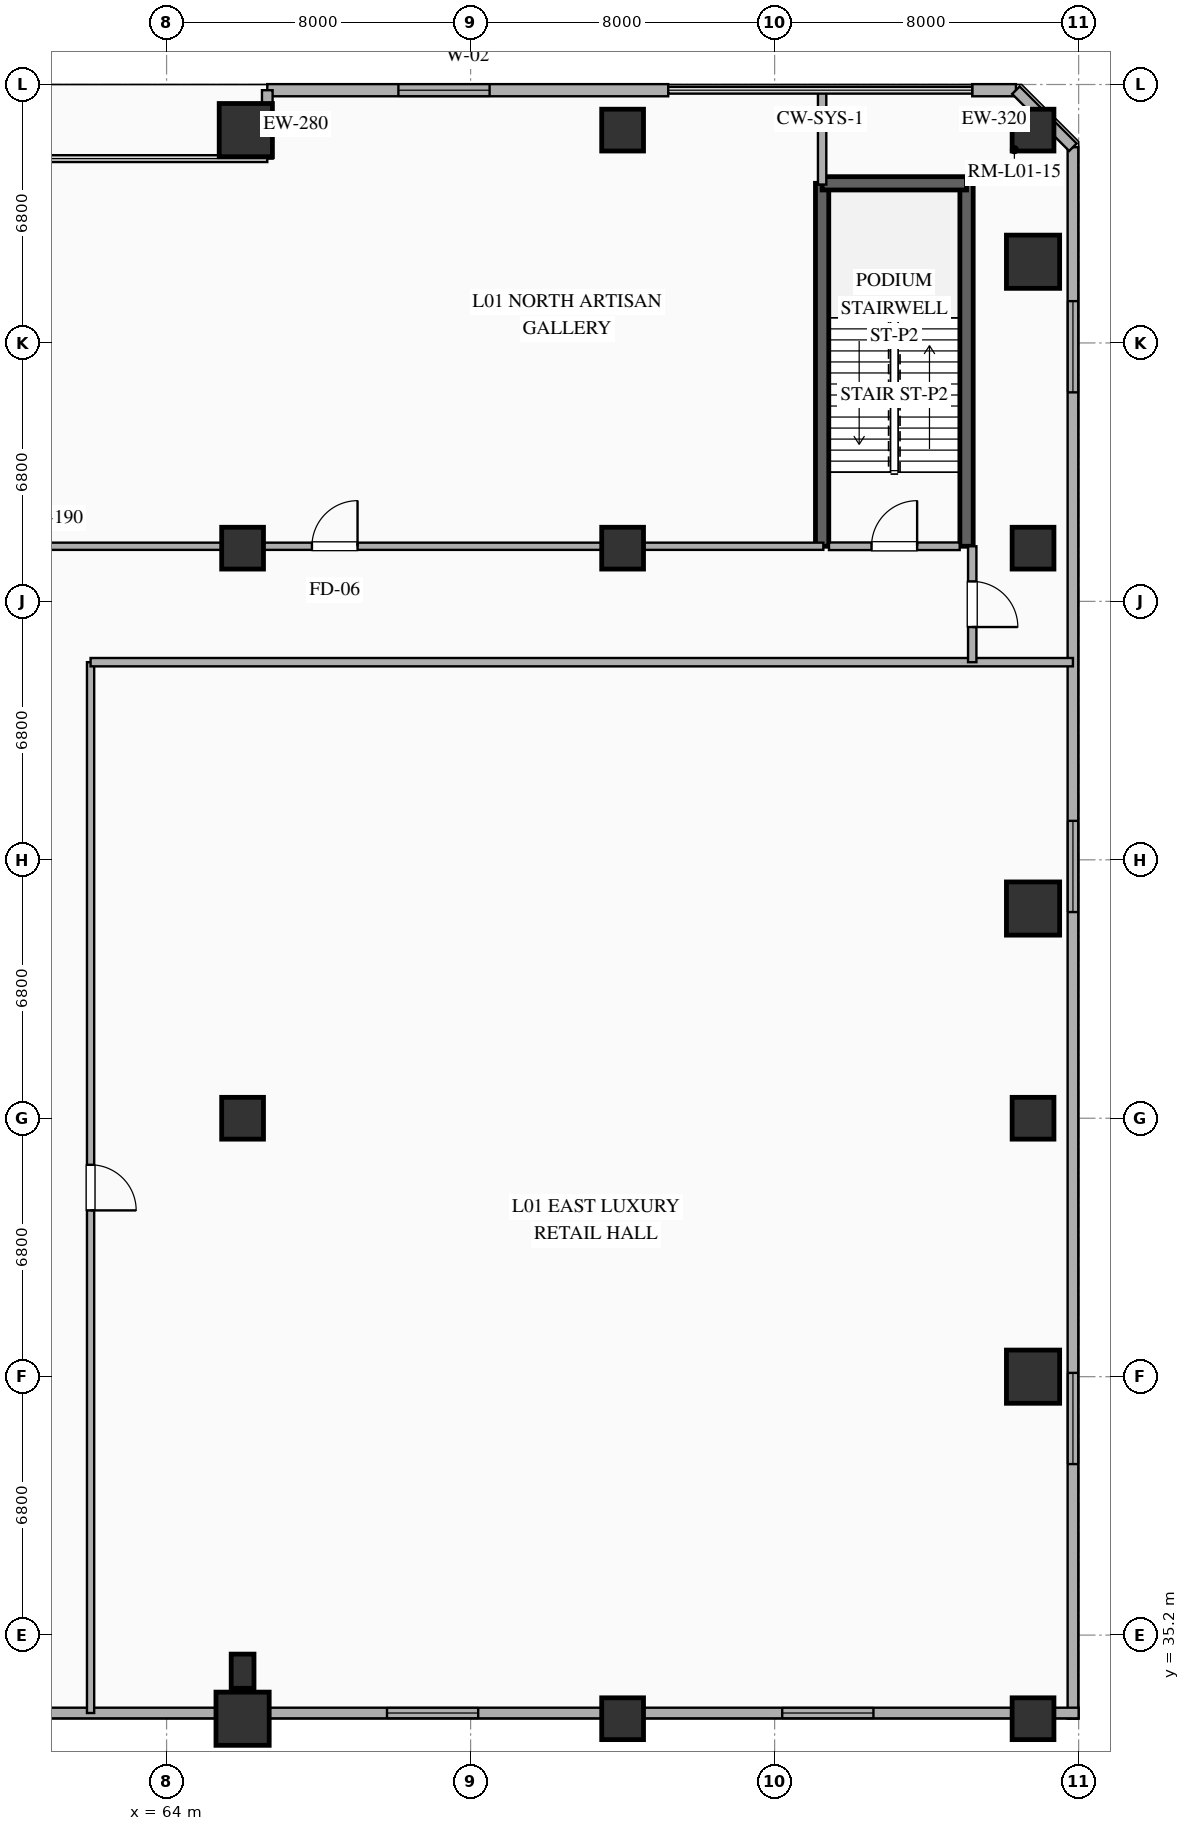
"""IFC4 building model, lengths in metres.
Left out: names, types, materials, properties, quantities, classifications, styles, units other than length and angle.
Written with IfcOpenShell. Run it as: python <this file> out.ifc"""

import sys

from ifc_helpers import new_model, si_unit, direction, frame, frame_2d, origin, origin_2d, place, context, subcontext, project, spatial, rectangle, extrude, element, fill, save


model = new_model("IFC4")
c1 = context("Model", 3, precision=1e-05, world=origin(), true_north=direction((0.0, 1.0)))
c2 = subcontext(c1, "Body", "Model", "MODEL_VIEW")
j1 = project(units=[si_unit("LENGTHUNIT", "METRE"), si_unit("PLANEANGLEUNIT", "RADIAN")], contexts=[c1])
p1 = place(None, origin())
s1 = spatial("IfcSite", under=j1, at=p1, CompositionType="ELEMENT")
p2 = place(p1, origin())
s2 = spatial("IfcBuilding", under=s1, at=p2, CompositionType="ELEMENT")
p3 = place(p2, frame((0.0, 0.0, 6.0)))
s3 = spatial("IfcBuildingStorey", under=s2, at=p3, CompositionType="ELEMENT", Elevation=6.0)
for number, where, z_axis, x_axis in (
    (1, (66.0, 63.8, 0.0), (0.0, 0.0, 1.0), (1.0, 0.0, 0.0)),
    (2, (76.0, 74.8, 0.0), (0.0, 0.0, 1.0), (1.0, 0.0, 0.0)),
    (3, (76.0, 63.8, 0.0), (0.0, 0.0, 1.0), (1.0, 0.0, 0.0)),
    (4, (86.8, 74.8, 0.0), (0.0, 0.0, 1.0), (1.0, 0.0, 0.0)),
    (5, (86.8, 63.8, 0.0), (0.0, 0.0, 1.0), (1.0, 0.0, 0.0)),
    (6, (86.8, 33.0, 0.0), (0.0, 0.0, 1.0), (1.0, 0.0, 0.0)),
    (7, (86.8, 48.8, 0.0), (0.0, 0.0, 1.0), (1.0, 0.0, 0.0)),
):
    element("IfcColumn", number, at=place(p3, frame(where, z_axis=z_axis, x_axis=x_axis)), inside=s3, PredefinedType="COLUMN", context=c2, shape_type="SweptSolid", body=[
        extrude(rectangle(XDim=1.1, YDim=1.1, at=origin_2d()), origin(), (0.0, 0.0, 1.0), 5.12),
    ])
p4 = place(p3, frame((66.0, 33.0, 0.0), z_axis=(0.0, 0.0, 1.0), x_axis=(1.0, 0.0, 0.0)))
e8 = element("IfcColumn", 8, at=p4, inside=s3, PredefinedType="COLUMN", context=c2, shape_type="SweptSolid", body=[
    extrude(rectangle(XDim=1.4, YDim=1.4, at=origin_2d()), origin(), (0.0, 0.0, 1.0), 5.12),
])
for number, where, z_axis, x_axis in (
    (9, (76.0, 33.0, 0.0), (0.0, 0.0, 1.0), (1.0, 0.0, 0.0)),
    (10, (66.0, 48.8, 0.0), (0.0, 0.0, 1.0), (1.0, 0.0, 0.0)),
):
    element("IfcColumn", number, at=place(p3, frame(where, z_axis=z_axis, x_axis=x_axis)), inside=s3, PredefinedType="COLUMN", context=c2, shape_type="SweptSolid", body=[
        extrude(rectangle(XDim=1.1, YDim=1.1, at=origin_2d()), origin(), (0.0, 0.0, 1.0), 5.12),
    ])
for number, where, z_axis, x_axis in (
    (11, (86.8, 42.0, 0.0), (0.0, 0.0, 1.0), (1.0, 0.0, 0.0)),
    (12, (86.8, 54.318, 0.0), (0.0, 0.0, 1.0), (1.0, 0.0, 0.0)),
    (13, (86.8, 71.337, 0.0), (0.0, 0.0, 1.0), (1.0, 0.0, 0.0)),
    (14, (66.084, 74.8, 0.0), (0.0, 0.0, 1.0), (1.0, 0.0, 0.0)),
):
    element("IfcColumn", number, at=place(p3, frame(where, z_axis=z_axis, x_axis=x_axis)), inside=s3, PredefinedType="COLUMN", context=c2, shape_type="SweptSolid", body=[
        extrude(rectangle(XDim=1.4, YDim=1.4, at=origin_2d()), origin(), (0.0, 0.0, 1.0), 5.12),
    ])
for number, where, z_axis, x_axis in (
    (15, (81.25, 63.85, 0.0), (0.0, 0.0, 1.0), (0.0, 1.0, 0.0)),
    (16, (85.05, 63.85, 0.0), (0.0, 0.0, 1.0), (0.0, 1.0, 0.0)),
):
    element("IfcWall", number, at=place(p3, frame(where, z_axis=z_axis, x_axis=x_axis)), inside=s3, PredefinedType="SHEAR", context=c2, shape_type="SweptSolid", body=[
        extrude(rectangle(XDim=9.55, YDim=0.35, at=frame_2d((4.775, 0.0))), origin(), (0.0, 0.0, 1.0), 5.12),
    ])
p5 = place(p3, frame((81.25, 73.4, 0.0), z_axis=(0.0, 0.0, 1.0), x_axis=(1.0, 0.0, 0.0)))
e17 = element("IfcWall", 17, at=p5, inside=s3, PredefinedType="SHEAR", context=c2, shape_type="SweptSolid", body=[
    extrude(rectangle(XDim=3.8, YDim=0.35, at=frame_2d((1.9, 0.0))), origin(), (0.0, 0.0, 1.0), 5.12),
])
p6 = place(p3, frame((66.0, 34.25, 0.0), z_axis=(0.0, 0.0, 1.0), x_axis=(1.0, 0.0, 0.0)))
e18 = element("IfcColumn", 18, at=p6, inside=s3, PredefinedType="PILASTER", context=c2, shape_type="SweptSolid", body=[
    extrude(rectangle(XDim=0.6, YDim=0.9, at=origin_2d()), origin(), (0.0, 0.0, 1.0), 5.12),
])
p7 = place(p3, frame((86.35, 75.85, 0.0), z_axis=(0.0, 0.0, 1.0), x_axis=(-1.0, 0.0, 0.0)))
e19 = element("IfcWall", 19, at=p7, inside=s3, PredefinedType="SOLIDWALL", context=c2, shape_type="SweptSolid", body=[
    extrude(rectangle(XDim=1.15, YDim=0.32, at=frame_2d((0.575, 0.0))), origin(), (0.0, 0.0, 1.0), 5.12),
])
p8 = place(p3, frame((66.65, 75.85, 0.0), z_axis=(0.0, 0.0, 1.0), x_axis=(1.0, 0.0, 0.0)))
e20 = element("IfcWall", 20, at=p8, inside=s3, PredefinedType="SOLIDWALL", context=c2, shape_type="SweptSolid", body=[
    extrude(rectangle(XDim=10.55, YDim=0.32, at=frame_2d((5.275, 0.0))), origin(), (0.0, 0.0, 1.0), 5.12),
])
p9 = place(p8, frame((3.45, 0.0, 0.9)))
e21 = element("IfcOpeningElement", 21, at=p9, cuts=e20, PredefinedType="OPENING", context=c2, shape_type="SweptSolid", body=[
    extrude(rectangle(XDim=2.4, YDim=2.6, at=frame_2d((1.2, 1.3))), frame((0.0, 0.17, 0.0), z_axis=(0.0, -1.0, 0.0), x_axis=(1.0, 0.0, 0.0)), (0.0, 0.0, 1.0), 0.34),
])
p10 = place(p3, frame((66.65, 75.85, 0.0), z_axis=(0.0, 0.0, 1.0), x_axis=(0.0, -1.0, 0.0)))
e22 = element("IfcWall", 22, at=p10, inside=s3, PredefinedType="SOLIDWALL", context=c2, shape_type="SweptSolid", body=[
    extrude(rectangle(XDim=1.8, YDim=0.28, at=frame_2d((0.9, 0.0))), origin(), (0.0, 0.0, 1.0), 5.12),
])
p11 = place(p3, frame((87.85, 74.35, 0.0), z_axis=(0.0, 0.0, 1.0), x_axis=(0.0, -1.0, 0.0)))
e23 = element("IfcWall", 23, at=p11, inside=s3, PredefinedType="SOLIDWALL", context=c2, shape_type="SweptSolid", body=[
    extrude(rectangle(XDim=41.35, YDim=0.28, at=frame_2d((20.675, 0.0))), origin(), (0.0, 0.0, 1.0), 5.12),
])
p12 = place(p11, frame((4.05, 0.0, 0.9)))
e24 = element("IfcOpeningElement", 24, at=p12, cuts=e23, PredefinedType="OPENING", context=c2, shape_type="SweptSolid", body=[
    extrude(rectangle(XDim=2.4, YDim=2.6, at=frame_2d((1.2, 1.3))), frame((0.0, 0.15, 0.0), z_axis=(0.0, -1.0, 0.0), x_axis=(1.0, 0.0, 0.0)), (0.0, 0.0, 1.0), 0.3),
])
p13 = place(p11, frame((17.725, 0.0, 0.9)))
e25 = element("IfcOpeningElement", 25, at=p13, cuts=e23, PredefinedType="OPENING", context=c2, shape_type="SweptSolid", body=[
    extrude(rectangle(XDim=2.4, YDim=2.6, at=frame_2d((1.2, 1.3))), frame((0.0, 0.15, 0.0), z_axis=(0.0, -1.0, 0.0), x_axis=(1.0, 0.0, 0.0)), (0.0, 0.0, 1.0), 0.3),
])
p14 = place(p11, frame((32.25, 0.0, 0.9)))
e26 = element("IfcOpeningElement", 26, at=p14, cuts=e23, PredefinedType="OPENING", context=c2, shape_type="SweptSolid", body=[
    extrude(rectangle(XDim=2.4, YDim=2.6, at=frame_2d((1.2, 1.3))), frame((0.0, 0.15, 0.0), z_axis=(0.0, -1.0, 0.0), x_axis=(1.0, 0.0, 0.0)), (0.0, 0.0, 1.0), 0.3),
])
p15 = place(p3, frame((88.0, 33.15, 0.0), z_axis=(0.0, 0.0, 1.0), x_axis=(-1.0, 0.0, 0.0)))
e27 = element("IfcWall", 27, at=p15, inside=s3, PredefinedType="SOLIDWALL", context=c2, shape_type="SweptSolid", body=[
    extrude(rectangle(XDim=80.0, YDim=0.28, at=frame_2d((40.0, 0.0))), origin(), (0.0, 0.0, 1.0), 5.12),
])
p16 = place(p15, frame((5.4, 0.0, 0.9)))
e28 = element("IfcOpeningElement", 28, at=p16, cuts=e27, PredefinedType="OPENING", context=c2, shape_type="SweptSolid", body=[
    extrude(rectangle(XDim=2.4, YDim=2.6, at=frame_2d((1.2, 1.3))), frame((0.0, 0.15, 0.0), z_axis=(0.0, -1.0, 0.0), x_axis=(1.0, 0.0, 0.0)), (0.0, 0.0, 1.0), 0.3),
])
p17 = place(p15, frame((15.8, 0.0, 0.9)))
e29 = element("IfcOpeningElement", 29, at=p17, cuts=e27, PredefinedType="OPENING", context=c2, shape_type="SweptSolid", body=[
    extrude(rectangle(XDim=2.4, YDim=2.6, at=frame_2d((1.2, 1.3))), frame((0.0, 0.15, 0.0), z_axis=(0.0, -1.0, 0.0), x_axis=(1.0, 0.0, 0.0)), (0.0, 0.0, 1.0), 0.3),
])
p18 = place(p15, frame((38.8, 0.0, 0.9)))
e30 = element("IfcOpeningElement", 30, at=p18, cuts=e27, PredefinedType="OPENING", context=c2, shape_type="SweptSolid", body=[
    extrude(rectangle(XDim=2.4, YDim=2.6, at=frame_2d((1.2, 1.3))), frame((0.0, 0.15, 0.0), z_axis=(0.0, -1.0, 0.0), x_axis=(1.0, 0.0, 0.0)), (0.0, 0.0, 1.0), 0.3),
])
p19 = place(p15, frame((61.8, 0.0, 0.9)))
e31 = element("IfcOpeningElement", 31, at=p19, cuts=e27, PredefinedType="OPENING", context=c2, shape_type="SweptSolid", body=[
    extrude(rectangle(XDim=2.4, YDim=2.6, at=frame_2d((1.2, 1.3))), frame((0.0, 0.15, 0.0), z_axis=(0.0, -1.0, 0.0), x_axis=(1.0, 0.0, 0.0)), (0.0, 0.0, 1.0), 0.3),
])
p20 = place(p15, frame((72.2, 0.0, 0.9)))
e32 = element("IfcOpeningElement", 32, at=p20, cuts=e27, PredefinedType="OPENING", context=c2, shape_type="SweptSolid", body=[
    extrude(rectangle(XDim=2.4, YDim=2.6, at=frame_2d((1.2, 1.3))), frame((0.0, 0.15, 0.0), z_axis=(0.0, -1.0, 0.0), x_axis=(1.0, 0.0, 0.0)), (0.0, 0.0, 1.0), 0.3),
])
p21 = place(p3, frame((87.85, 74.35, 0.0), z_axis=(0.0, 0.0, 1.0), x_axis=(-0.707106781187, 0.707106781187, 0.0)))
e33 = element("IfcWall", 33, at=p21, inside=s3, PredefinedType="SOLIDWALL", context=c2, shape_type="SweptSolid", body=[
    extrude(rectangle(XDim=2.121, YDim=0.28, at=frame_2d((1.061, 0.0))), origin(), (0.0, 0.0, 1.0), 5.12),
])
p22 = place(p3, frame((81.43, 63.85, 0.0), z_axis=(0.0, 0.0, 1.0), x_axis=(1.0, 0.0, 0.0)))
e34 = element("IfcWall", 34, at=p22, inside=s3, PredefinedType="SOLIDWALL", context=c2, shape_type="SweptSolid", body=[
    extrude(rectangle(XDim=3.44, YDim=0.2, at=frame_2d((1.72, 0.0))), origin(), (0.0, 0.0, 1.0), 4.32),
])
p23 = place(p22, frame((1.12, 0.0, 0.0)))
e35 = element("IfcOpeningElement", 35, at=p23, cuts=e34, PredefinedType="OPENING", context=c2, shape_type="SweptSolid", body=[
    extrude(rectangle(XDim=1.2, YDim=2.15, at=frame_2d((0.6, 1.075))), frame((0.0, 0.11, 0.0), z_axis=(0.0, -1.0, 0.0), x_axis=(1.0, 0.0, 0.0)), (0.0, 0.0, 1.0), 0.22),
])
p24 = place(p3, frame((40.768, 63.85, 0.0), z_axis=(0.0, 0.0, 1.0), x_axis=(1.0, 0.0, 0.0)))
e36 = element("IfcWall", 36, at=p24, inside=s3, PredefinedType="PARTITIONING", context=c2, shape_type="SweptSolid", body=[
    extrude(rectangle(XDim=40.514, YDim=0.19, at=frame_2d((20.257, 0.0))), origin(), (0.0, 0.0, 1.0), 4.32),
])
p25 = place(p24, frame((27.057, 0.0, 0.0)))
e37 = element("IfcOpeningElement", 37, at=p25, cuts=e36, PredefinedType="OPENING", context=c2, shape_type="SweptSolid", body=[
    extrude(rectangle(XDim=1.2, YDim=2.25, at=frame_2d((0.6, 1.125))), frame((0.0, 0.105, 0.0), z_axis=(0.0, -1.0, 0.0), x_axis=(1.0, 0.0, 0.0)), (0.0, 0.0, 1.0), 0.21),
])
p26 = place(p24, frame((8.232, 0.0, 0.0)))
e38 = element("IfcOpeningElement", 38, at=p26, cuts=e36, PredefinedType="OPENING", context=c2, shape_type="SweptSolid", body=[
    extrude(rectangle(XDim=1.2, YDim=2.25, at=frame_2d((0.6, 1.125))), frame((0.0, 0.105, 0.0), z_axis=(0.0, -1.0, 0.0), x_axis=(1.0, 0.0, 0.0)), (0.0, 0.0, 1.0), 0.21),
])
p27 = place(p24, frame((3.982, 0.0, 0.0)))
e39 = element("IfcOpeningElement", 39, at=p27, cuts=e36, PredefinedType="OPENING", context=c2, shape_type="SweptSolid", body=[
    extrude(rectangle(XDim=0.9, YDim=2.1, at=frame_2d((0.45, 1.05))), frame((0.0, 0.105, 0.0), z_axis=(0.0, -1.0, 0.0), x_axis=(1.0, 0.0, 0.0)), (0.0, 0.0, 1.0), 0.21),
])
p28 = place(p3, frame((62.0, 60.8, 0.0), z_axis=(0.0, 0.0, 1.0), x_axis=(0.0, -1.0, 0.0)))
e40 = element("IfcWall", 40, at=p28, inside=s3, PredefinedType="PARTITIONING", context=c2, shape_type="SweptSolid", body=[
    extrude(rectangle(XDim=27.65, YDim=0.19, at=frame_2d((13.825, 0.0))), origin(), (0.0, 0.0, 1.0), 4.32),
])
p29 = place(p28, frame((13.225, 0.0, 0.0)))
e41 = element("IfcOpeningElement", 41, at=p29, cuts=e40, PredefinedType="OPENING", context=c2, shape_type="SweptSolid", body=[
    extrude(rectangle(XDim=1.2, YDim=2.25, at=frame_2d((0.6, 1.125))), frame((0.0, 0.105, 0.0), z_axis=(0.0, -1.0, 0.0), x_axis=(1.0, 0.0, 0.0)), (0.0, 0.0, 1.0), 0.21),
])
p30 = place(p3, frame((87.85, 60.8, 0.0), z_axis=(0.0, 0.0, 1.0), x_axis=(-1.0, 0.0, 0.0)))
e42 = element("IfcWall", 42, at=p30, inside=s3, PredefinedType="SOLIDWALL", context=c2, shape_type="SweptSolid", body=[
    extrude(rectangle(XDim=25.85, YDim=0.22, at=frame_2d((12.925, 0.0))), origin(), (0.0, 0.0, 1.0), 4.32),
])
p31 = place(p3, frame((85.2, 63.85, 0.0), z_axis=(0.0, 0.0, 1.0), x_axis=(0.0, -1.0, 0.0)))
e43 = element("IfcWall", 43, at=p31, inside=s3, PredefinedType="SOLIDWALL", context=c2, shape_type="SweptSolid", body=[
    extrude(rectangle(XDim=3.05, YDim=0.22, at=frame_2d((1.525, 0.0))), origin(), (0.0, 0.0, 1.0), 4.32),
])
p32 = place(p31, frame((0.925, 0.0, 0.0)))
e44 = element("IfcOpeningElement", 44, at=p32, cuts=e43, PredefinedType="OPENING", context=c2, shape_type="SweptSolid", body=[
    extrude(rectangle(XDim=1.2, YDim=2.25, at=frame_2d((0.6, 1.125))), frame((0.0, 0.12, 0.0), z_axis=(0.0, -1.0, 0.0), x_axis=(1.0, 0.0, 0.0)), (0.0, 0.0, 1.0), 0.24),
])
p33 = place(p3, frame((81.25, 75.85, 0.0), z_axis=(0.0, 0.0, 1.0), x_axis=(0.0, -1.0, 0.0)))
e45 = element("IfcWall", 45, at=p33, inside=s3, PredefinedType="SOLIDWALL", context=c2, shape_type="SweptSolid", body=[
    extrude(rectangle(XDim=2.482, YDim=0.22, at=frame_2d((1.241, 0.0))), origin(), (0.0, 0.0, 1.0), 4.32),
])
p34 = place(p9, origin())
e46 = element("IfcWindow", 46, at=p34, inside=s3, PartitioningType="SINGLE_PANEL", PredefinedType="WINDOW", context=c2, shape_type="SweptSolid", body=[
    extrude(rectangle(XDim=2.4, YDim=2.6, at=frame_2d((1.2, 1.3))), frame((0.0, 0.03, 0.0), z_axis=(0.0, -1.0, 0.0), x_axis=(1.0, 0.0, 0.0)), (0.0, 0.0, 1.0), 0.06),
])
fill(e21, e46)
p35 = place(p12, origin())
e47 = element("IfcWindow", 47, at=p35, inside=s3, PartitioningType="SINGLE_PANEL", PredefinedType="WINDOW", context=c2, shape_type="SweptSolid", body=[
    extrude(rectangle(XDim=2.4, YDim=2.6, at=frame_2d((1.2, 1.3))), frame((0.0, 0.03, 0.0), z_axis=(0.0, -1.0, 0.0), x_axis=(1.0, 0.0, 0.0)), (0.0, 0.0, 1.0), 0.06),
])
fill(e24, e47)
p36 = place(p13, origin())
e48 = element("IfcWindow", 48, at=p36, inside=s3, PartitioningType="SINGLE_PANEL", PredefinedType="WINDOW", context=c2, shape_type="SweptSolid", body=[
    extrude(rectangle(XDim=2.4, YDim=2.6, at=frame_2d((1.2, 1.3))), frame((0.0, 0.03, 0.0), z_axis=(0.0, -1.0, 0.0), x_axis=(1.0, 0.0, 0.0)), (0.0, 0.0, 1.0), 0.06),
])
fill(e25, e48)
p37 = place(p14, origin())
e49 = element("IfcWindow", 49, at=p37, inside=s3, PartitioningType="SINGLE_PANEL", PredefinedType="WINDOW", context=c2, shape_type="SweptSolid", body=[
    extrude(rectangle(XDim=2.4, YDim=2.6, at=frame_2d((1.2, 1.3))), frame((0.0, 0.03, 0.0), z_axis=(0.0, -1.0, 0.0), x_axis=(1.0, 0.0, 0.0)), (0.0, 0.0, 1.0), 0.06),
])
fill(e26, e49)
p38 = place(p16, origin())
e50 = element("IfcWindow", 50, at=p38, inside=s3, PartitioningType="SINGLE_PANEL", PredefinedType="WINDOW", context=c2, shape_type="SweptSolid", body=[
    extrude(rectangle(XDim=2.4, YDim=2.6, at=frame_2d((1.2, 1.3))), frame((0.0, 0.03, 0.0), z_axis=(0.0, -1.0, 0.0), x_axis=(1.0, 0.0, 0.0)), (0.0, 0.0, 1.0), 0.06),
])
fill(e28, e50)
p39 = place(p17, origin())
e51 = element("IfcWindow", 51, at=p39, inside=s3, PartitioningType="SINGLE_PANEL", PredefinedType="WINDOW", context=c2, shape_type="SweptSolid", body=[
    extrude(rectangle(XDim=2.4, YDim=2.6, at=frame_2d((1.2, 1.3))), frame((0.0, 0.03, 0.0), z_axis=(0.0, -1.0, 0.0), x_axis=(1.0, 0.0, 0.0)), (0.0, 0.0, 1.0), 0.06),
])
fill(e29, e51)
p40 = place(p23, origin())
e52 = element("IfcDoor", 52, at=p40, inside=s3, OperationType="SINGLE_SWING_RIGHT", PredefinedType="DOOR", context=c2, shape_type="SweptSolid", body=[
    extrude(rectangle(XDim=1.2, YDim=2.15, at=frame_2d((0.6, 1.075))), frame((0.0, 0.025, 0.0), z_axis=(0.0, -1.0, 0.0), x_axis=(1.0, 0.0, 0.0)), (0.0, 0.0, 1.0), 0.05),
])
fill(e35, e52)
p41 = place(p25, origin())
e53 = element("IfcDoor", 53, at=p41, inside=s3, OperationType="SINGLE_SWING_RIGHT", PredefinedType="DOOR", context=c2, shape_type="SweptSolid", body=[
    extrude(rectangle(XDim=1.2, YDim=2.25, at=frame_2d((0.6, 1.125))), frame((0.0, 0.025, 0.0), z_axis=(0.0, -1.0, 0.0), x_axis=(1.0, 0.0, 0.0)), (0.0, 0.0, 1.0), 0.05),
])
fill(e37, e53)
p42 = place(p29, origin())
e54 = element("IfcDoor", 54, at=p42, inside=s3, OperationType="SINGLE_SWING_RIGHT", PredefinedType="DOOR", context=c2, shape_type="SweptSolid", body=[
    extrude(rectangle(XDim=1.2, YDim=2.25, at=frame_2d((0.6, 1.125))), frame((0.0, 0.025, 0.0), z_axis=(0.0, -1.0, 0.0), x_axis=(1.0, 0.0, 0.0)), (0.0, 0.0, 1.0), 0.05),
])
fill(e41, e54)
p43 = place(p32, origin())
e55 = element("IfcDoor", 55, at=p43, inside=s3, OperationType="SINGLE_SWING_RIGHT", PredefinedType="DOOR", context=c2, shape_type="SweptSolid", body=[
    extrude(rectangle(XDim=1.2, YDim=2.25, at=frame_2d((0.6, 1.125))), frame((0.0, 0.025, 0.0), z_axis=(0.0, -1.0, 0.0), x_axis=(1.0, 0.0, 0.0)), (0.0, 0.0, 1.0), 0.05),
])
fill(e44, e55)
save(model, sys.argv[1])
